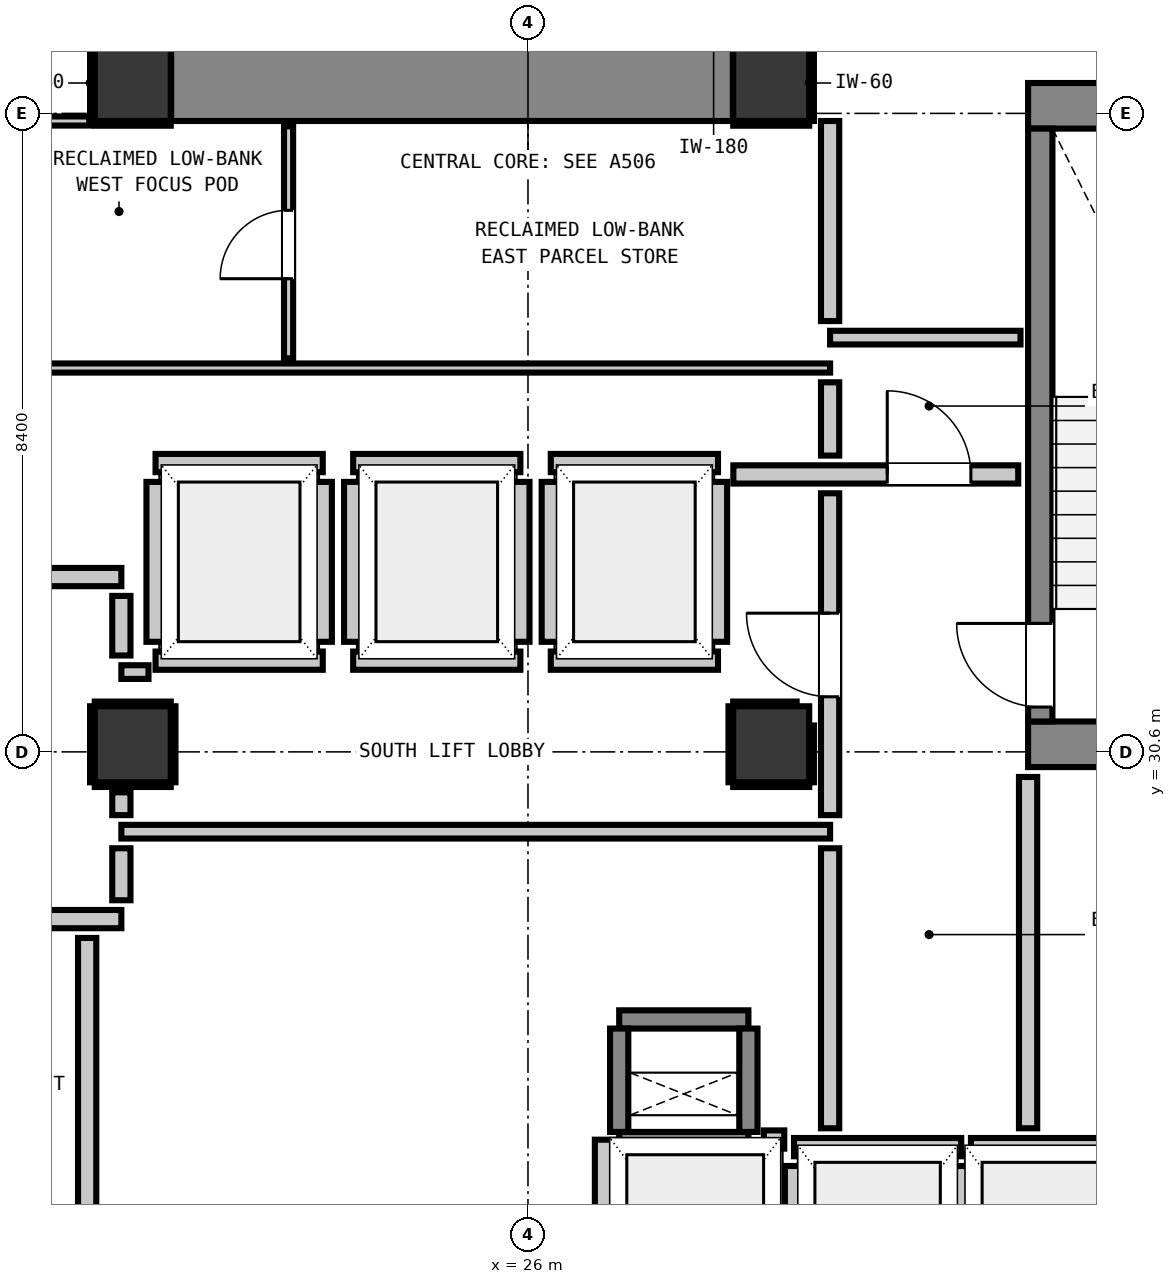
"""IFC4 building model, lengths in metres.
Left out: names, types, materials, properties, quantities, classifications, styles, units other than length and angle.
Written with IfcOpenShell. Run it as: python <this file> out.ifc"""

import sys

from ifc_helpers import new_model, si_unit, direction, frame, frame_2d, origin, origin_2d, place, context, subcontext, project, spatial, rectangle, extrude, element, fill, save


model = new_model("IFC4")
c1 = context("Model", 3, precision=1e-05, world=origin(), true_north=direction((0.0, 1.0)))
c2 = subcontext(c1, "Body", "Model", "MODEL_VIEW")
j1 = project(units=[si_unit("LENGTHUNIT", "METRE"), si_unit("PLANEANGLEUNIT", "RADIAN")], contexts=[c1])
p1 = place(None, origin())
s1 = spatial("IfcSite", under=j1, at=p1, CompositionType="ELEMENT")
p2 = place(p1, origin())
s2 = spatial("IfcBuilding", under=s1, at=p2, CompositionType="ELEMENT")
p3 = place(p2, frame((0.0, 0.0, 116.04)))
s3 = spatial("IfcBuildingStorey", under=s2, at=p3, CompositionType="ELEMENT", Elevation=116.04)
for number, where, z_axis, x_axis in (
    (1, (20.8, 39.4, 0.0), (0.0, 0.0, 1.0), (1.0, 0.0, 0.0)),
    (2, (29.2, 39.4, 0.0), (0.0, 0.0, 1.0), (1.0, 0.0, 0.0)),
):
    element("IfcColumn", number, at=place(p3, frame(where, z_axis=z_axis, x_axis=x_axis)), inside=s3, PredefinedType="COLUMN", context=c2, shape_type="SweptSolid", body=[
        extrude(rectangle(XDim=1.0, YDim=1.0, at=origin_2d()), origin(), (0.0, 0.0, 1.0), 3.32),
    ])
p4 = place(p3, frame((32.58, 39.1, 0.0), z_axis=(0.0, 0.0, 1.0), x_axis=(1.0, 0.0, 0.0)))
e3 = element("IfcWall", 3, at=p4, inside=s3, PredefinedType="SHEAR", context=c2, shape_type="SweptSolid", body=[
    extrude(rectangle(XDim=4.08, YDim=0.6, at=frame_2d((2.04, 0.0))), origin(), (0.0, 0.0, 1.0), 3.32),
])
p5 = place(p3, frame((32.58, 30.7, 0.0), z_axis=(0.0, 0.0, 1.0), x_axis=(1.0, 0.0, 0.0)))
e4 = element("IfcWall", 4, at=p5, inside=s3, PredefinedType="SHEAR", context=c2, shape_type="SweptSolid", body=[
    extrude(rectangle(XDim=3.415, YDim=0.6, at=frame_2d((1.708, 0.0))), origin(), (0.0, 0.0, 1.0), 3.32),
])
p6 = place(p3, frame((21.305, 39.4, 0.0), z_axis=(0.0, 0.0, 1.0), x_axis=(1.0, 0.0, 0.0)))
e5 = element("IfcWall", 5, at=p6, inside=s3, PredefinedType="SHEAR", context=c2, shape_type="SweptSolid", body=[
    extrude(rectangle(XDim=7.39, YDim=1.0, at=frame_2d((3.695, 0.0))), origin(), (0.0, 0.0, 1.0), 3.32),
])
p7 = place(p3, frame((32.74, 31.0, 0.0), z_axis=(0.0, 0.0, 1.0), x_axis=(0.0, 1.0, 0.0)))
e6 = element("IfcWall", 6, at=p7, inside=s3, PredefinedType="SHEAR", context=c2, shape_type="SweptSolid", body=[
    extrude(rectangle(XDim=7.8, YDim=0.32, at=frame_2d((3.9, 0.0))), origin(), (0.0, 0.0, 1.0), 3.32),
])
p8 = place(p7, frame((0.19, 0.0, 0.0)))
e7 = element("IfcOpeningElement", 7, at=p8, cuts=e6, PredefinedType="OPENING", context=c2, shape_type="SweptSolid", body=[
    extrude(rectangle(XDim=1.1, YDim=2.15, at=frame_2d((0.55, 1.075))), frame((0.0, 0.17, 0.0), z_axis=(0.0, -1.0, 0.0), x_axis=(1.0, 0.0, 0.0)), (0.0, 0.0, 1.0), 0.34),
])
for number, where, z_axis, x_axis in (
    (8, (27.2, 25.48, 0.0), (0.0, 0.0, 1.0), (1.0, 0.0, 0.0)),
    (9, (27.2, 27.08, 0.0), (0.0, 0.0, 1.0), (1.0, 0.0, 0.0)),
):
    element("IfcWall", number, at=place(p3, frame(where, z_axis=z_axis, x_axis=x_axis)), inside=s3, PredefinedType="SHEAR", context=c2, shape_type="SweptSolid", body=[
        extrude(rectangle(XDim=1.7, YDim=0.24, at=frame_2d((0.85, 0.0))), origin(), (0.0, 0.0, 1.0), 3.32),
    ])
for number, where, z_axis, x_axis in (
    (10, (27.2, 25.6, 0.0), (0.0, 0.0, 1.0), (0.0, 1.0, 0.0)),
    (11, (28.9, 25.6, 0.0), (0.0, 0.0, 1.0), (0.0, 1.0, 0.0)),
):
    element("IfcWall", number, at=place(p3, frame(where, z_axis=z_axis, x_axis=x_axis)), inside=s3, PredefinedType="SHEAR", context=c2, shape_type="SweptSolid", body=[
        extrude(rectangle(XDim=1.36, YDim=0.24, at=frame_2d((0.68, 0.0))), origin(), (0.0, 0.0, 1.0), 3.32),
    ])
for number, where, z_axis, x_axis in (
    (12, (20.8, 30.7, 0.0), (0.0, 0.0, 1.0), (1.0, 0.0, 0.0)),
    (13, (29.2, 30.7, 0.0), (0.0, 0.0, 1.0), (1.0, 0.0, 0.0)),
):
    element("IfcColumn", number, at=place(p3, frame(where, z_axis=z_axis, x_axis=x_axis)), inside=s3, PredefinedType="COLUMN", context=c2, shape_type="SweptSolid", body=[
        extrude(rectangle(XDim=1.0, YDim=1.0, at=origin_2d()), origin(), (0.0, 0.0, 1.0), 3.32),
    ])
for number, where, z_axis, x_axis in (
    (14, (21.1, 31.8, 0.0), (0.0, 0.0, 1.0), (1.0, 0.0, 0.0)),
    (15, (21.1, 34.4, 0.0), (0.0, 0.0, 1.0), (1.0, 0.0, 0.0)),
):
    element("IfcWall", number, at=place(p3, frame(where, z_axis=z_axis, x_axis=x_axis)), inside=s3, PredefinedType="PARTITIONING", context=c2, shape_type="SweptSolid", body=[
        extrude(rectangle(XDim=2.2, YDim=0.24, at=frame_2d((1.1, 0.0))), origin(), (0.0, 0.0, 1.0), 3.08),
    ])
p9 = place(p3, frame((21.1, 32.048, 0.0), z_axis=(0.0, 0.0, 1.0), x_axis=(0.0, 1.0, 0.0)))
e16 = element("IfcWall", 16, at=p9, inside=s3, PredefinedType="PARTITIONING", context=c2, shape_type="SweptSolid", body=[
    extrude(rectangle(XDim=2.104, YDim=0.24, at=frame_2d((1.052, 0.0))), origin(), (0.0, 0.0, 1.0), 2.315),
])
p10 = place(p3, frame((23.3, 32.048, 0.0), z_axis=(0.0, 0.0, 1.0), x_axis=(0.0, 1.0, 0.0)))
e17 = element("IfcWall", 17, at=p10, inside=s3, PredefinedType="PARTITIONING", context=c2, shape_type="SweptSolid", body=[
    extrude(rectangle(XDim=2.104, YDim=0.24, at=frame_2d((1.052, 0.0))), origin(), (0.0, 0.0, 1.0), 3.08),
])
for number, where, z_axis, x_axis in (
    (18, (23.7, 31.8, 0.0), (0.0, 0.0, 1.0), (1.0, 0.0, 0.0)),
    (19, (23.7, 34.4, 0.0), (0.0, 0.0, 1.0), (1.0, 0.0, 0.0)),
):
    element("IfcWall", number, at=place(p3, frame(where, z_axis=z_axis, x_axis=x_axis)), inside=s3, PredefinedType="PARTITIONING", context=c2, shape_type="SweptSolid", body=[
        extrude(rectangle(XDim=2.2, YDim=0.24, at=frame_2d((1.1, 0.0))), origin(), (0.0, 0.0, 1.0), 3.08),
    ])
for number, where, z_axis, x_axis in (
    (20, (23.7, 32.048, 0.0), (0.0, 0.0, 1.0), (0.0, 1.0, 0.0)),
    (21, (25.9, 32.048, 0.0), (0.0, 0.0, 1.0), (0.0, 1.0, 0.0)),
):
    element("IfcWall", number, at=place(p3, frame(where, z_axis=z_axis, x_axis=x_axis)), inside=s3, PredefinedType="PARTITIONING", context=c2, shape_type="SweptSolid", body=[
        extrude(rectangle(XDim=2.104, YDim=0.24, at=frame_2d((1.052, 0.0))), origin(), (0.0, 0.0, 1.0), 3.08),
    ])
for number, where, z_axis, x_axis in (
    (22, (26.3, 31.8, 0.0), (0.0, 0.0, 1.0), (1.0, 0.0, 0.0)),
    (23, (26.3, 34.4, 0.0), (0.0, 0.0, 1.0), (1.0, 0.0, 0.0)),
):
    element("IfcWall", number, at=place(p3, frame(where, z_axis=z_axis, x_axis=x_axis)), inside=s3, PredefinedType="PARTITIONING", context=c2, shape_type="SweptSolid", body=[
        extrude(rectangle(XDim=2.2, YDim=0.24, at=frame_2d((1.1, 0.0))), origin(), (0.0, 0.0, 1.0), 3.08),
    ])
for number, where, z_axis, x_axis in (
    (24, (26.3, 32.048, 0.0), (0.0, 0.0, 1.0), (0.0, 1.0, 0.0)),
    (25, (28.5, 32.048, 0.0), (0.0, 0.0, 1.0), (0.0, 1.0, 0.0)),
):
    element("IfcWall", number, at=place(p3, frame(where, z_axis=z_axis, x_axis=x_axis)), inside=s3, PredefinedType="PARTITIONING", context=c2, shape_type="SweptSolid", body=[
        extrude(rectangle(XDim=2.104, YDim=0.24, at=frame_2d((1.052, 0.0))), origin(), (0.0, 0.0, 1.0), 3.08),
    ])
p11 = place(p3, frame((29.5, 25.4, 0.0), z_axis=(0.0, 0.0, 1.0), x_axis=(1.0, 0.0, 0.0)))
e26 = element("IfcWall", 26, at=p11, inside=s3, PredefinedType="PARTITIONING", context=c2, shape_type="SweptSolid", body=[
    extrude(rectangle(XDim=2.2, YDim=0.24, at=frame_2d((1.1, 0.0))), origin(), (0.0, 0.0, 1.0), 3.08),
])
p12 = place(p3, frame((29.5, 22.632, 0.0), z_axis=(0.0, 0.0, 1.0), x_axis=(0.0, 1.0, 0.0)))
e27 = element("IfcWall", 27, at=p12, inside=s3, PredefinedType="PARTITIONING", context=c2, shape_type="SweptSolid", body=[
    extrude(rectangle(XDim=2.52, YDim=0.24, at=frame_2d((1.26, 0.0))), origin(), (0.0, 0.0, 1.0), 2.315),
])
p13 = place(p3, frame((31.7, 22.63, 0.0), z_axis=(0.0, 0.0, 1.0), x_axis=(0.0, 1.0, 0.0)))
e28 = element("IfcWall", 28, at=p13, inside=s3, PredefinedType="PARTITIONING", context=c2, shape_type="SweptSolid", body=[
    extrude(rectangle(XDim=2.522, YDim=0.24, at=frame_2d((1.261, 0.0))), origin(), (0.0, 0.0, 1.0), 3.08),
])
p14 = place(p3, frame((31.828, 25.4, 0.0), z_axis=(0.0, 0.0, 1.0), x_axis=(1.0, 0.0, 0.0)))
e29 = element("IfcWall", 29, at=p14, inside=s3, PredefinedType="PARTITIONING", context=c2, shape_type="SweptSolid", body=[
    extrude(rectangle(XDim=2.072, YDim=0.24, at=frame_2d((1.036, 0.0))), origin(), (0.0, 0.0, 1.0), 3.08),
])
p15 = place(p3, frame((29.103, 25.5, 0.0), z_axis=(0.0, 0.0, 1.0), x_axis=(1.0, 0.0, 0.0)))
e30 = element("IfcWall", 30, at=p15, inside=s3, PredefinedType="PARTITIONING", context=c2, shape_type="SweptSolid", body=[
    extrude(rectangle(XDim=0.269, YDim=0.24, at=frame_2d((0.135, 0.0))), origin(), (0.0, 0.0, 1.0), 3.08),
])
p16 = place(p3, frame((27.0, 22.63, 0.0), z_axis=(0.0, 0.0, 1.0), x_axis=(0.0, 1.0, 0.0)))
e31 = element("IfcWall", 31, at=p16, inside=s3, PredefinedType="PARTITIONING", context=c2, shape_type="SweptSolid", body=[
    extrude(rectangle(XDim=2.868, YDim=0.24, at=frame_2d((1.434, 0.0))), origin(), (0.0, 0.0, 1.0), 3.08),
])
p17 = place(p3, frame((17.45, 28.4, 0.0), z_axis=(0.0, 0.0, 1.0), x_axis=(1.0, 0.0, 0.0)))
e32 = element("IfcWall", 32, at=p17, inside=s3, PredefinedType="PARTITIONING", context=c2, shape_type="SweptSolid", body=[
    extrude(rectangle(XDim=3.2, YDim=0.24, at=frame_2d((1.6, 0.0))), origin(), (0.0, 0.0, 1.0), 3.08),
])
p18 = place(p17, frame((0.784, 0.0, 0.0)))
e33 = element("IfcOpeningElement", 33, at=p18, cuts=e32, PredefinedType="OPENING", context=c2, shape_type="SweptSolid", body=[
    extrude(rectangle(XDim=1.1, YDim=2.15, at=frame_2d((0.55, 1.075))), frame((0.0, 0.13, 0.0), z_axis=(0.0, -1.0, 0.0), x_axis=(1.0, 0.0, 0.0)), (0.0, 0.0, 1.0), 0.26),
])
p19 = place(p3, frame((17.45, 32.9, 0.0), z_axis=(0.0, 0.0, 1.0), x_axis=(1.0, 0.0, 0.0)))
e34 = element("IfcWall", 34, at=p19, inside=s3, PredefinedType="PARTITIONING", context=c2, shape_type="SweptSolid", body=[
    extrude(rectangle(XDim=3.2, YDim=0.24, at=frame_2d((1.6, 0.0))), origin(), (0.0, 0.0, 1.0), 3.08),
])
p20 = place(p19, frame((0.159, 0.0, 0.0)))
e35 = element("IfcOpeningElement", 35, at=p20, cuts=e34, PredefinedType="OPENING", context=c2, shape_type="SweptSolid", body=[
    extrude(rectangle(XDim=1.1, YDim=2.15, at=frame_2d((0.55, 1.075))), frame((0.0, 0.13, 0.0), z_axis=(0.0, -1.0, 0.0), x_axis=(1.0, 0.0, 0.0)), (0.0, 0.0, 1.0), 0.26),
])
p21 = place(p3, frame((28.702, 34.25, 0.0), z_axis=(0.0, 0.0, 1.0), x_axis=(1.0, 0.0, 0.0)))
e36 = element("IfcWall", 36, at=p21, inside=s3, PredefinedType="PARTITIONING", context=c2, shape_type="SweptSolid", body=[
    extrude(rectangle(XDim=3.748, YDim=0.24, at=frame_2d((1.874, 0.0))), origin(), (0.0, 0.0, 1.0), 3.08),
])
p22 = place(p21, frame((2.025, 0.0, 0.0)))
e37 = element("IfcOpeningElement", 37, at=p22, cuts=e36, PredefinedType="OPENING", context=c2, shape_type="SweptSolid", body=[
    extrude(rectangle(XDim=1.1, YDim=2.15, at=frame_2d((0.55, 1.075))), frame((0.0, 0.13, 0.0), z_axis=(0.0, -1.0, 0.0), x_axis=(1.0, 0.0, 0.0)), (0.0, 0.0, 1.0), 0.26),
])
p23 = place(p3, frame((20.65, 29.55, 0.0), z_axis=(0.0, 0.0, 1.0), x_axis=(1.0, 0.0, 0.0)))
e38 = element("IfcWall", 38, at=p23, inside=s3, PredefinedType="PARTITIONING", context=c2, shape_type="SweptSolid", body=[
    extrude(rectangle(XDim=9.325, YDim=0.18, at=frame_2d((4.663, 0.0))), origin(), (0.0, 0.0, 1.0), 3.08),
])
p24 = place(p3, frame((20.65, 31.65, 0.0), z_axis=(0.0, 0.0, 1.0), x_axis=(1.0, 0.0, 0.0)))
e39 = element("IfcWall", 39, at=p24, inside=s3, PredefinedType="PARTITIONING", context=c2, shape_type="SweptSolid", body=[
    extrude(rectangle(XDim=0.357, YDim=0.18, at=frame_2d((0.179, 0.0))), origin(), (0.0, 0.0, 1.0), 3.08),
])
p25 = place(p3, frame((29.975, 36.05, 0.0), z_axis=(0.0, 0.0, 1.0), x_axis=(1.0, 0.0, 0.0)))
e40 = element("IfcWall", 40, at=p25, inside=s3, PredefinedType="PARTITIONING", context=c2, shape_type="SweptSolid", body=[
    extrude(rectangle(XDim=2.505, YDim=0.18, at=frame_2d((1.252, 0.0))), origin(), (0.0, 0.0, 1.0), 3.08),
])
p26 = place(p3, frame((18.95, 35.65, 0.0), z_axis=(0.0, 0.0, 1.0), x_axis=(1.0, 0.0, 0.0)))
e41 = element("IfcWall", 41, at=p26, inside=s3, PredefinedType="PARTITIONING", context=c2, shape_type="SweptSolid", body=[
    extrude(rectangle(XDim=11.025, YDim=0.12, at=frame_2d((5.513, 0.0))), origin(), (0.0, 0.0, 1.0), 3.08),
])
p27 = place(p3, frame((18.95, 38.9, 0.0), z_axis=(0.0, 0.0, 1.0), x_axis=(1.0, 0.0, 0.0)))
e42 = element("IfcWall", 42, at=p27, inside=s3, PredefinedType="PARTITIONING", context=c2, shape_type="SweptSolid", body=[
    extrude(rectangle(XDim=1.278, YDim=0.12, at=frame_2d((0.639, 0.0))), origin(), (0.0, 0.0, 1.0), 3.08),
])
p28 = place(p3, frame((20.2, 22.586, 0.0), z_axis=(0.0, 0.0, 1.0), x_axis=(0.0, 1.0, 0.0)))
e43 = element("IfcWall", 43, at=p28, inside=s3, PredefinedType="PARTITIONING", context=c2, shape_type="SweptSolid", body=[
    extrude(rectangle(XDim=5.566, YDim=0.24, at=frame_2d((2.783, 0.0))), origin(), (0.0, 0.0, 1.0), 3.08),
])
p29 = place(p3, frame((20.65, 28.648, 0.0), z_axis=(0.0, 0.0, 1.0), x_axis=(0.0, 1.0, 0.0)))
e44 = element("IfcWall", 44, at=p29, inside=s3, PredefinedType="PARTITIONING", context=c2, shape_type="SweptSolid", body=[
    extrude(rectangle(XDim=0.684, YDim=0.24, at=frame_2d((0.342, 0.0))), origin(), (0.0, 0.0, 1.0), 2.315),
])
p30 = place(p3, frame((20.65, 29.768, 0.0), z_axis=(0.0, 0.0, 1.0), x_axis=(0.0, 1.0, 0.0)))
e45 = element("IfcWall", 45, at=p30, inside=s3, PredefinedType="PARTITIONING", context=c2, shape_type="SweptSolid", body=[
    extrude(rectangle(XDim=0.3, YDim=0.24, at=frame_2d((0.15, 0.0))), origin(), (0.0, 0.0, 1.0), 2.315),
])
p31 = place(p3, frame((20.65, 31.868, 0.0), z_axis=(0.0, 0.0, 1.0), x_axis=(0.0, 1.0, 0.0)))
e46 = element("IfcWall", 46, at=p31, inside=s3, PredefinedType="PARTITIONING", context=c2, shape_type="SweptSolid", body=[
    extrude(rectangle(XDim=0.784, YDim=0.24, at=frame_2d((0.392, 0.0))), origin(), (0.0, 0.0, 1.0), 2.315),
])
p32 = place(p3, frame((29.975, 25.648, 0.0), z_axis=(0.0, 0.0, 1.0), x_axis=(0.0, 1.0, 0.0)))
e47 = element("IfcWall", 47, at=p32, inside=s3, PredefinedType="PARTITIONING", context=c2, shape_type="SweptSolid", body=[
    extrude(rectangle(XDim=3.684, YDim=0.24, at=frame_2d((1.842, 0.0))), origin(), (0.0, 0.0, 1.0), 3.08),
])
p33 = place(p3, frame((29.975, 29.768, 0.0), z_axis=(0.0, 0.0, 1.0), x_axis=(0.0, 1.0, 0.0)))
e48 = element("IfcWall", 48, at=p33, inside=s3, PredefinedType="PARTITIONING", context=c2, shape_type="SweptSolid", body=[
    extrude(rectangle(XDim=4.234, YDim=0.24, at=frame_2d((2.117, 0.0))), origin(), (0.0, 0.0, 1.0), 3.08),
])
p34 = place(p33, frame((1.557, 0.0, 0.0)))
e49 = element("IfcOpeningElement", 49, at=p34, cuts=e48, PredefinedType="OPENING", context=c2, shape_type="SweptSolid", body=[
    extrude(rectangle(XDim=1.1, YDim=2.15, at=frame_2d((0.55, 1.075))), frame((0.0, 0.13, 0.0), z_axis=(0.0, -1.0, 0.0), x_axis=(1.0, 0.0, 0.0)), (0.0, 0.0, 1.0), 0.26),
])
p35 = place(p3, frame((29.975, 34.498, 0.0), z_axis=(0.0, 0.0, 1.0), x_axis=(0.0, 1.0, 0.0)))
e50 = element("IfcWall", 50, at=p35, inside=s3, PredefinedType="PARTITIONING", context=c2, shape_type="SweptSolid", body=[
    extrude(rectangle(XDim=0.964, YDim=0.24, at=frame_2d((0.482, 0.0))), origin(), (0.0, 0.0, 1.0), 3.08),
])
p36 = place(p3, frame((29.975, 36.268, 0.0), z_axis=(0.0, 0.0, 1.0), x_axis=(0.0, 1.0, 0.0)))
e51 = element("IfcWall", 51, at=p36, inside=s3, PredefinedType="PARTITIONING", context=c2, shape_type="SweptSolid", body=[
    extrude(rectangle(XDim=2.632, YDim=0.24, at=frame_2d((1.316, 0.0))), origin(), (0.0, 0.0, 1.0), 3.08),
])
p37 = place(p3, frame((32.58, 25.648, 0.0), z_axis=(0.0, 0.0, 1.0), x_axis=(0.0, 1.0, 0.0)))
e52 = element("IfcWall", 52, at=p37, inside=s3, PredefinedType="PARTITIONING", context=c2, shape_type="SweptSolid", body=[
    extrude(rectangle(XDim=4.622, YDim=0.24, at=frame_2d((2.311, 0.0))), origin(), (0.0, 0.0, 1.0), 3.08),
])
p38 = place(p3, frame((22.85, 35.778, 0.0), z_axis=(0.0, 0.0, 1.0), x_axis=(0.0, 1.0, 0.0)))
e53 = element("IfcWall", 53, at=p38, inside=s3, PredefinedType="PARTITIONING", context=c2, shape_type="SweptSolid", body=[
    extrude(rectangle(XDim=3.052, YDim=0.12, at=frame_2d((1.526, 0.0))), origin(), (0.0, 0.0, 1.0), 3.08),
])
p39 = place(p38, frame((1.047, 0.0, 0.0)))
e54 = element("IfcOpeningElement", 54, at=p39, cuts=e53, PredefinedType="OPENING", context=c2, shape_type="SweptSolid", body=[
    extrude(rectangle(XDim=0.9, YDim=2.1, at=frame_2d((0.45, 1.05))), frame((0.0, 0.07, 0.0), z_axis=(0.0, -1.0, 0.0), x_axis=(1.0, 0.0, 0.0)), (0.0, 0.0, 1.0), 0.14),
])
for number, where, z_axis, x_axis in (
    (55, (20.3, 38.868, 0.0), (0.0, 0.0, 1.0), (1.0, 0.0, 0.0)),
    (56, (20.268, 38.9, 0.0), (0.0, 0.0, 1.0), (0.0, 1.0, 0.0)),
    (57, (28.7, 38.868, 0.0), (0.0, 0.0, 1.0), (1.0, 0.0, 0.0)),
    (58, (29.732, 38.9, 0.0), (0.0, 0.0, 1.0), (0.0, 1.0, 0.0)),
    (59, (20.3, 30.168, 0.0), (0.0, 0.0, 1.0), (1.0, 0.0, 0.0)),
    (60, (20.3, 31.232, 0.0), (0.0, 0.0, 1.0), (1.0, 0.0, 0.0)),
    (61, (20.268, 30.2, 0.0), (0.0, 0.0, 1.0), (0.0, 1.0, 0.0)),
    (62, (21.332, 30.2, 0.0), (0.0, 0.0, 1.0), (0.0, 1.0, 0.0)),
    (63, (28.7, 30.168, 0.0), (0.0, 0.0, 1.0), (1.0, 0.0, 0.0)),
):
    element("IfcWall", number, at=place(p3, frame(where, z_axis=z_axis, x_axis=x_axis)), inside=s3, PredefinedType="PARTITIONING", context=c2, shape_type="SweptSolid", body=[
        extrude(rectangle(XDim=1.0, YDim=0.06, at=frame_2d((0.5, 0.0))), origin(), (0.0, 0.0, 1.0), 1.45),
    ])
p40 = place(p3, frame((28.7, 31.232, 0.0), z_axis=(0.0, 0.0, 1.0), x_axis=(1.0, 0.0, 0.0)))
e64 = element("IfcWall", 64, at=p40, inside=s3, PredefinedType="PARTITIONING", context=c2, shape_type="SweptSolid", body=[
    extrude(rectangle(XDim=0.835, YDim=0.06, at=frame_2d((0.417, 0.0))), origin(), (0.0, 0.0, 1.0), 1.45),
])
p41 = place(p3, frame((28.668, 30.2, 0.0), z_axis=(0.0, 0.0, 1.0), x_axis=(0.0, 1.0, 0.0)))
e65 = element("IfcWall", 65, at=p41, inside=s3, PredefinedType="PARTITIONING", context=c2, shape_type="SweptSolid", body=[
    extrude(rectangle(XDim=1.0, YDim=0.06, at=frame_2d((0.5, 0.0))), origin(), (0.0, 0.0, 1.0), 1.45),
])
p42 = place(p3, frame((29.732, 30.2, 0.0), z_axis=(0.0, 0.0, 1.0), x_axis=(0.0, 1.0, 0.0)))
e66 = element("IfcWall", 66, at=p42, inside=s3, PredefinedType="PARTITIONING", context=c2, shape_type="SweptSolid", body=[
    extrude(rectangle(XDim=0.747, YDim=0.06, at=frame_2d((0.374, 0.0))), origin(), (0.0, 0.0, 1.0), 1.45),
])
p43 = place(p8, origin())
e67 = element("IfcDoor", 67, at=p43, inside=s3, OperationType="SINGLE_SWING_RIGHT", PredefinedType="DOOR", context=c2, shape_type="SweptSolid", body=[
    extrude(rectangle(XDim=1.1, YDim=2.15, at=frame_2d((0.55, 1.075))), frame((0.0, 0.025, 0.0), z_axis=(0.0, -1.0, 0.0), x_axis=(1.0, 0.0, 0.0)), (0.0, 0.0, 1.0), 0.05),
])
fill(e7, e67)
p44 = place(p34, origin())
e68 = element("IfcDoor", 68, at=p44, inside=s3, OperationType="SINGLE_SWING_RIGHT", PredefinedType="DOOR", context=c2, shape_type="SweptSolid", body=[
    extrude(rectangle(XDim=1.1, YDim=2.15, at=frame_2d((0.55, 1.075))), frame((0.0, 0.025, 0.0), z_axis=(0.0, -1.0, 0.0), x_axis=(1.0, 0.0, 0.0)), (0.0, 0.0, 1.0), 0.05),
])
fill(e49, e68)
p45 = place(p22, origin())
e69 = element("IfcDoor", 69, at=p45, inside=s3, OperationType="SINGLE_SWING_LEFT", PredefinedType="DOOR", context=c2, shape_type="SweptSolid", body=[
    extrude(rectangle(XDim=1.1, YDim=2.15, at=frame_2d((0.55, 1.075))), frame((0.0, 0.025, 0.0), z_axis=(0.0, -1.0, 0.0), x_axis=(1.0, 0.0, 0.0)), (0.0, 0.0, 1.0), 0.05),
])
fill(e37, e69)
p46 = place(p39, origin())
e70 = element("IfcDoor", 70, at=p46, inside=s3, OperationType="SINGLE_SWING_LEFT", PredefinedType="DOOR", context=c2, shape_type="SweptSolid", body=[
    extrude(rectangle(XDim=0.9, YDim=2.1, at=frame_2d((0.45, 1.05))), frame((0.0, 0.025, 0.0), z_axis=(0.0, -1.0, 0.0), x_axis=(1.0, 0.0, 0.0)), (0.0, 0.0, 1.0), 0.05),
])
fill(e54, e70)
save(model, sys.argv[1])
